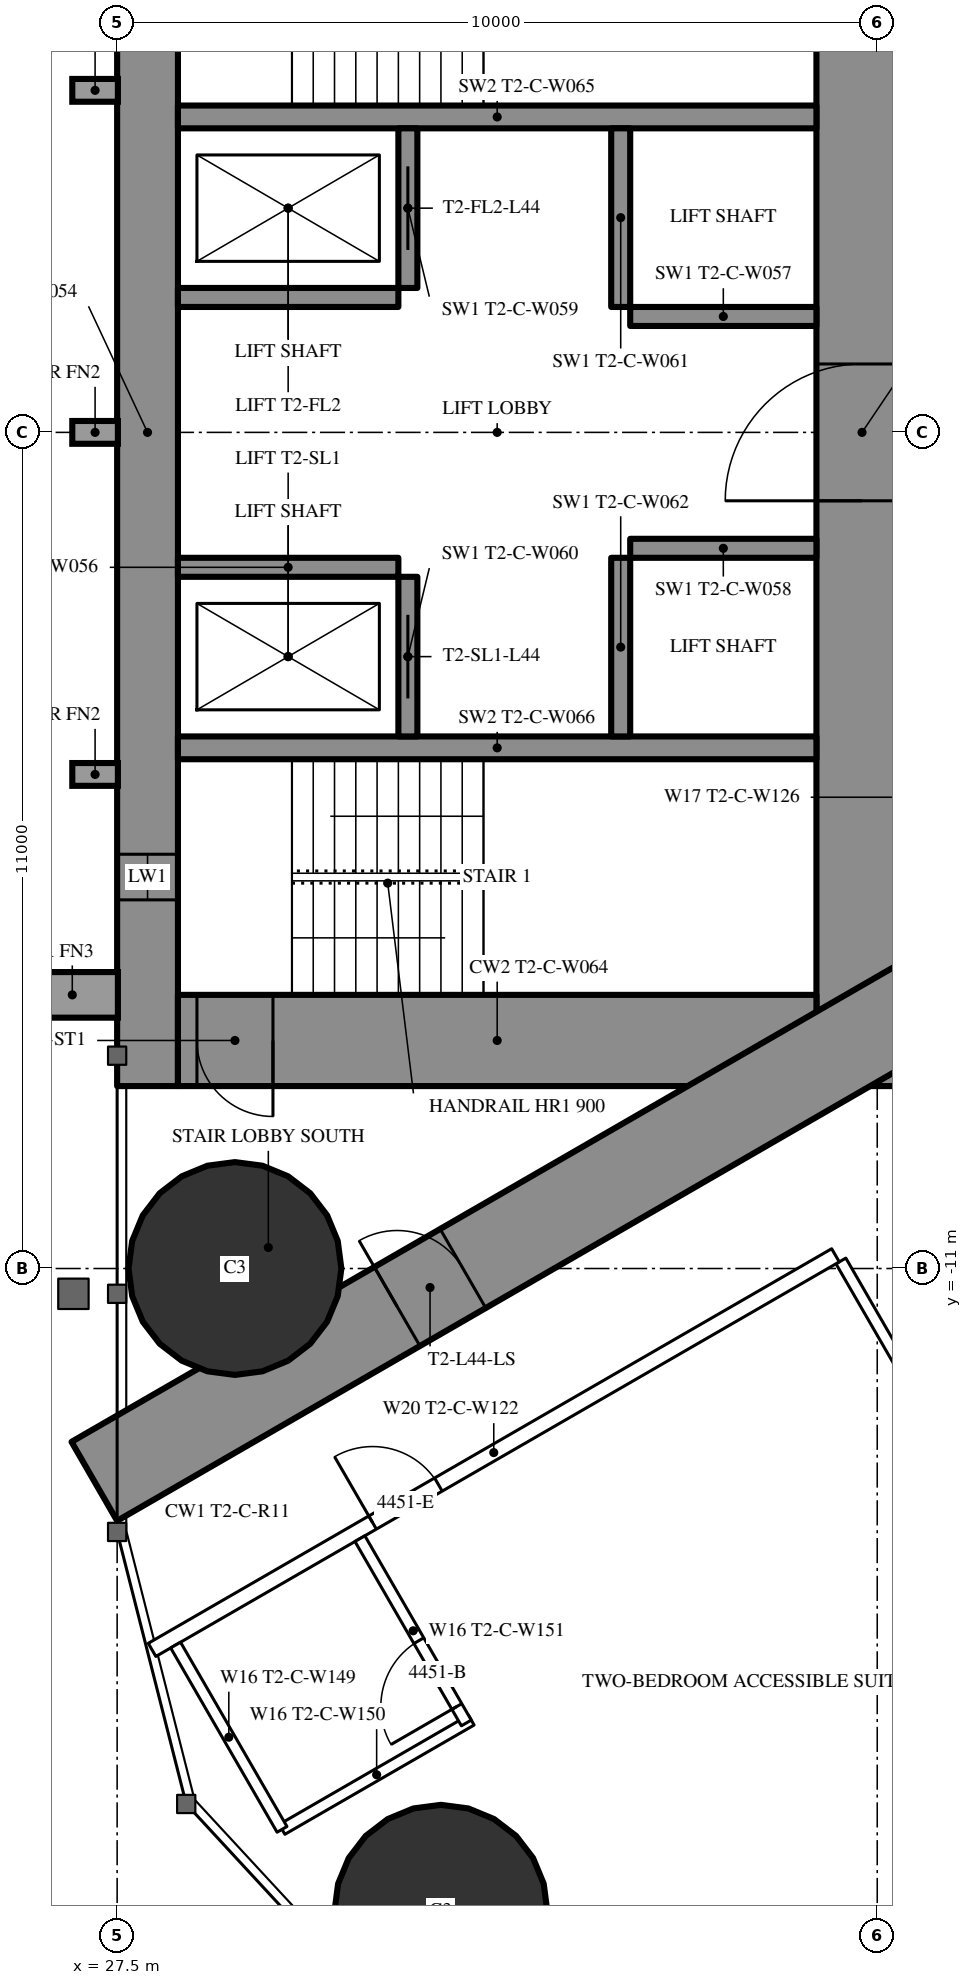
"""IFC4 building model, lengths in metres.
Left out: names, types, materials, properties, quantities, classifications, styles, units other than length and angle.
Written with IfcOpenShell. Run it as: python <this file> out.ifc"""

import sys

from ifc_helpers import new_model, si_unit, direction, frame, frame_2d, origin, origin_2d, place, context, subcontext, project, spatial, rectangle, circle, extrude, element, fill, save


model = new_model("IFC4")
c1 = context("Model", 3, precision=1e-05, world=origin(), true_north=direction((0.0, 1.0)))
c2 = subcontext(c1, "Body", "Model", "MODEL_VIEW")
j1 = project(units=[si_unit("LENGTHUNIT", "METRE"), si_unit("PLANEANGLEUNIT", "RADIAN")], contexts=[c1])
p1 = place(None, origin())
s1 = spatial("IfcSite", under=j1, at=p1, CompositionType="ELEMENT")
p2 = place(p1, origin())
s2 = spatial("IfcBuilding", under=s1, at=p2, CompositionType="ELEMENT")
p3 = place(p2, frame((0.0, 0.0, 166.8)))
s3 = spatial("IfcBuildingStorey", under=s2, at=p3, CompositionType="ELEMENT", Elevation=166.8)
for number, where, z_axis, x_axis in (
    (1, (31.76, -19.456, 0.0), (0.0, 0.0, 1.0), (1.0, 0.0, 0.0)),
    (2, (29.05, -11.0, 0.0), (0.0, 0.0, 1.0), (1.0, 0.0, 0.0)),
):
    element("IfcColumn", number, at=place(p3, frame(where, z_axis=z_axis, x_axis=x_axis)), inside=s3, PredefinedType="COLUMN", context=c2, shape_type="SweptSolid", body=[
        extrude(circle(Radius=1.4, at=origin_2d()), origin(), (0.0, 0.0, 1.0), 3.5),
    ])
p4 = place(p3, frame((27.9, -8.6, 0.0), z_axis=(0.0, 0.0, 1.0), x_axis=(0.0, 1.0, 0.0)))
e3 = element("IfcWall", 3, at=p4, inside=s3, PredefinedType="SHEAR", context=c2, shape_type="SweptSolid", body=[
    extrude(rectangle(XDim=17.2, YDim=0.8, at=frame_2d((8.6, 0.0))), origin(), (0.0, 0.0, 1.0), 3.5),
])
p5 = place(p4, frame((2.45, 0.0, 0.6)))
e4 = element("IfcOpeningElement", 4, at=p5, cuts=e3, PredefinedType="OPENING", context=c2, shape_type="SweptSolid", body=[
    extrude(rectangle(XDim=0.6, YDim=2.1, at=frame_2d((0.3, 1.05))), frame((0.0, 0.41, 0.0), z_axis=(0.0, -1.0, 0.0), x_axis=(1.0, 0.0, 0.0)), (0.0, 0.0, 1.0), 0.82),
])
p6 = place(p4, frame((14.15, 0.0, 0.6)))
e5 = element("IfcOpeningElement", 5, at=p6, cuts=e3, PredefinedType="OPENING", context=c2, shape_type="SweptSolid", body=[
    extrude(rectangle(XDim=0.6, YDim=2.1, at=frame_2d((0.3, 1.05))), frame((0.0, 0.41, 0.0), z_axis=(0.0, -1.0, 0.0), x_axis=(1.0, 0.0, 0.0)), (0.0, 0.0, 1.0), 0.82),
])
p7 = place(p3, frame((37.3, -8.6, 0.0), z_axis=(0.0, 0.0, 1.0), x_axis=(0.0, 1.0, 0.0)))
e6 = element("IfcWall", 6, at=p7, inside=s3, PredefinedType="SHEAR", context=c2, shape_type="SweptSolid", body=[
    extrude(rectangle(XDim=17.2, YDim=1.2, at=frame_2d((8.6, 0.0))), origin(), (0.0, 0.0, 1.0), 3.5),
])
p8 = place(p7, frame((7.7, 0.0, 0.0)))
e7 = element("IfcOpeningElement", 7, at=p8, cuts=e6, PredefinedType="OPENING", context=c2, shape_type="SweptSolid", body=[
    extrude(rectangle(XDim=1.8, YDim=2.2, at=frame_2d((0.9, 1.1))), frame((0.0, 0.61, 0.0), z_axis=(0.0, -1.0, 0.0), x_axis=(1.0, 0.0, 0.0)), (0.0, 0.0, 1.0), 1.22),
])
p9 = place(p3, frame((28.3, -8.0, 0.0), z_axis=(0.0, 0.0, 1.0), x_axis=(1.0, 0.0, 0.0)))
e8 = element("IfcWall", 8, at=p9, inside=s3, PredefinedType="SHEAR", context=c2, shape_type="SweptSolid", body=[
    extrude(rectangle(XDim=8.4, YDim=1.2, at=frame_2d((4.2, 0.0))), origin(), (0.0, 0.0, 1.0), 3.5),
])
p10 = place(p9, frame((0.25, 0.0, 0.0)))
e9 = element("IfcOpeningElement", 9, at=p10, cuts=e8, PredefinedType="OPENING", context=c2, shape_type="SweptSolid", body=[
    extrude(rectangle(XDim=1.0, YDim=2.2, at=frame_2d((0.5, 1.1))), frame((0.0, 0.61, 0.0), z_axis=(0.0, -1.0, 0.0), x_axis=(1.0, 0.0, 0.0)), (0.0, 0.0, 1.0), 1.22),
])
for number, where, z_axis, x_axis in (
    (10, (28.3, -4.15, 0.0), (0.0, 0.0, 1.0), (1.0, 0.0, 0.0)),
    (11, (28.3, 4.15, 0.0), (0.0, 0.0, 1.0), (1.0, 0.0, 0.0)),
):
    element("IfcWall", number, at=place(p3, frame(where, z_axis=z_axis, x_axis=x_axis)), inside=s3, PredefinedType="SHEAR", context=c2, shape_type="SweptSolid", body=[
        extrude(rectangle(XDim=8.4, YDim=0.3, at=frame_2d((4.2, 0.0))), origin(), (0.0, 0.0, 1.0), 3.5),
    ])
p11 = place(p3, frame((31.325, -4.0, 0.0), z_axis=(0.0, 0.0, 1.0), x_axis=(0.0, 1.0, 0.0)))
e12 = element("IfcWall", 12, at=p11, inside=s3, PredefinedType="SHEAR", context=c2, shape_type="SweptSolid", body=[
    extrude(rectangle(XDim=2.1, YDim=0.25, at=frame_2d((1.05, 0.0))), origin(), (0.0, 0.0, 1.0), 3.5),
])
p12 = place(p11, frame((0.5, 0.0, 0.0)))
e13 = element("IfcOpeningElement", 13, at=p12, cuts=e12, PredefinedType="OPENING", context=c2, shape_type="SweptSolid", body=[
    extrude(rectangle(XDim=1.1, YDim=2.2, at=frame_2d((0.55, 1.1))), frame((0.0, 0.135, 0.0), z_axis=(0.0, -1.0, 0.0), x_axis=(1.0, 0.0, 0.0)), (0.0, 0.0, 1.0), 0.27),
])
p13 = place(p3, frame((34.125, -4.0, 0.0), z_axis=(0.0, 0.0, 1.0), x_axis=(0.0, 1.0, 0.0)))
e14 = element("IfcWall", 14, at=p13, inside=s3, PredefinedType="SHEAR", context=c2, shape_type="SweptSolid", body=[
    extrude(rectangle(XDim=2.35, YDim=0.25, at=frame_2d((1.175, 0.0))), origin(), (0.0, 0.0, 1.0), 3.5),
])
p14 = place(p3, frame((28.3, -1.775, 0.0), z_axis=(0.0, 0.0, 1.0), x_axis=(1.0, 0.0, 0.0)))
e15 = element("IfcWall", 15, at=p14, inside=s3, PredefinedType="SHEAR", context=c2, shape_type="SweptSolid", body=[
    extrude(rectangle(XDim=2.9, YDim=0.25, at=frame_2d((1.45, 0.0))), origin(), (0.0, 0.0, 1.0), 3.5),
])
p15 = place(p3, frame((34.25, -1.525, 0.0), z_axis=(0.0, 0.0, 1.0), x_axis=(1.0, 0.0, 0.0)))
e16 = element("IfcWall", 16, at=p15, inside=s3, PredefinedType="SHEAR", context=c2, shape_type="SweptSolid", body=[
    extrude(rectangle(XDim=2.45, YDim=0.25, at=frame_2d((1.225, 0.0))), origin(), (0.0, 0.0, 1.0), 3.5),
])
p16 = place(p3, frame((31.325, 1.9, 0.0), z_axis=(0.0, 0.0, 1.0), x_axis=(0.0, 1.0, 0.0)))
e17 = element("IfcWall", 17, at=p16, inside=s3, PredefinedType="SHEAR", context=c2, shape_type="SweptSolid", body=[
    extrude(rectangle(XDim=2.1, YDim=0.25, at=frame_2d((1.05, 0.0))), origin(), (0.0, 0.0, 1.0), 3.5),
])
p17 = place(p16, frame((0.5, 0.0, 0.0)))
e18 = element("IfcOpeningElement", 18, at=p17, cuts=e17, PredefinedType="OPENING", context=c2, shape_type="SweptSolid", body=[
    extrude(rectangle(XDim=1.1, YDim=2.2, at=frame_2d((0.55, 1.1))), frame((0.0, 0.135, 0.0), z_axis=(0.0, -1.0, 0.0), x_axis=(1.0, 0.0, 0.0)), (0.0, 0.0, 1.0), 0.27),
])
p18 = place(p3, frame((34.125, 1.65, 0.0), z_axis=(0.0, 0.0, 1.0), x_axis=(0.0, 1.0, 0.0)))
e19 = element("IfcWall", 19, at=p18, inside=s3, PredefinedType="SHEAR", context=c2, shape_type="SweptSolid", body=[
    extrude(rectangle(XDim=2.35, YDim=0.25, at=frame_2d((1.175, 0.0))), origin(), (0.0, 0.0, 1.0), 3.5),
])
p19 = place(p3, frame((28.3, 1.775, 0.0), z_axis=(0.0, 0.0, 1.0), x_axis=(1.0, 0.0, 0.0)))
e20 = element("IfcWall", 20, at=p19, inside=s3, PredefinedType="SHEAR", context=c2, shape_type="SweptSolid", body=[
    extrude(rectangle(XDim=2.9, YDim=0.25, at=frame_2d((1.45, 0.0))), origin(), (0.0, 0.0, 1.0), 3.5),
])
p20 = place(p3, frame((34.25, 1.525, 0.0), z_axis=(0.0, 0.0, 1.0), x_axis=(1.0, 0.0, 0.0)))
e21 = element("IfcWall", 21, at=p20, inside=s3, PredefinedType="SHEAR", context=c2, shape_type="SweptSolid", body=[
    extrude(rectangle(XDim=2.45, YDim=0.25, at=frame_2d((1.225, 0.0))), origin(), (0.0, 0.0, 1.0), 3.5),
])
p21 = place(p3, frame((27.2, -13.8, 0.0), z_axis=(0.0, 0.0, 1.0), x_axis=(0.866027159892, 0.499996958321, 0.0)))
e22 = element("IfcWall", 22, at=p21, inside=s3, PredefinedType="SHEAR", context=c2, shape_type="SweptSolid", body=[
    extrude(rectangle(XDim=27.947, YDim=1.2, at=frame_2d((13.973, 0.0))), origin(), (0.0, 0.0, 1.0), 3.5),
])
p22 = place(p21, frame((4.6, 0.0, 0.0)))
e23 = element("IfcOpeningElement", 23, at=p22, cuts=e22, PredefinedType="OPENING", context=c2, shape_type="SweptSolid", body=[
    extrude(rectangle(XDim=1.0, YDim=2.2, at=frame_2d((0.5, 1.1))), frame((0.0, 0.61, 0.0), z_axis=(0.0, -1.0, 0.0), x_axis=(1.0, 0.0, 0.0)), (0.0, 0.0, 1.0), 1.22),
])
p23 = place(p21, frame((13.395, 0.0, 0.0)))
e24 = element("IfcOpeningElement", 24, at=p23, cuts=e22, PredefinedType="OPENING", context=c2, shape_type="SweptSolid", body=[
    extrude(rectangle(XDim=1.8, YDim=2.2, at=frame_2d((0.9, 1.1))), frame((0.0, 0.61, 0.0), z_axis=(0.0, -1.0, 0.0), x_axis=(1.0, 0.0, 0.0)), (0.0, 0.0, 1.0), 1.22),
])
p24 = place(p3, frame((27.2, 13.8, 0.0), z_axis=(0.0, 0.0, 1.0), x_axis=(0.866024515034, -0.500001539357, 0.0)))
e25 = element("IfcWall", 25, at=p24, inside=s3, PredefinedType="SHEAR", context=c2, shape_type="SweptSolid", body=[
    extrude(rectangle(XDim=26.907, YDim=1.2, at=frame_2d((13.454, 0.0))), origin(), (0.0, 0.0, 1.0), 3.5),
])
p25 = place(p24, frame((4.6, 0.0, 0.0)))
e26 = element("IfcOpeningElement", 26, at=p25, cuts=e25, PredefinedType="OPENING", context=c2, shape_type="SweptSolid", body=[
    extrude(rectangle(XDim=1.0, YDim=2.2, at=frame_2d((0.5, 1.1))), frame((0.0, 0.61, 0.0), z_axis=(0.0, -1.0, 0.0), x_axis=(1.0, 0.0, 0.0)), (0.0, 0.0, 1.0), 1.22),
])
p26 = place(p24, frame((13.395, 0.0, 0.0)))
e27 = element("IfcOpeningElement", 27, at=p26, cuts=e25, PredefinedType="OPENING", context=c2, shape_type="SweptSolid", body=[
    extrude(rectangle(XDim=1.8, YDim=2.2, at=frame_2d((0.9, 1.1))), frame((0.0, 0.61, 0.0), z_axis=(0.0, -1.0, 0.0), x_axis=(1.0, 0.0, 0.0)), (0.0, 0.0, 1.0), 1.22),
])
p27 = place(p3, frame((37.022, -10.9, 0.0), z_axis=(0.0, 0.0, 1.0), x_axis=(0.499998620953, -0.866026199976, 0.0)))
e28 = element("IfcWall", 28, at=p27, inside=s3, PredefinedType="PARTITIONING", context=c2, shape_type="SweptSolid", body=[
    extrude(rectangle(XDim=9.77, YDim=0.15, at=frame_2d((4.885, 0.0))), origin(), (0.0, 0.0, 1.0), 3.25),
])
p28 = place(p3, frame((27.959, -16.017, 0.0), z_axis=(0.0, 0.0, 1.0), x_axis=(0.866026201739, 0.499998617899, 0.0)))
e29 = element("IfcWall", 29, at=p28, inside=s3, PredefinedType="PARTITIONING", context=c2, shape_type="SweptSolid", body=[
    extrude(rectangle(XDim=10.382, YDim=0.2, at=frame_2d((5.191, 0.0))), origin(), (0.0, 0.0, 1.0), 3.25),
])
p29 = place(p28, frame((3.35, 0.0, 0.0)))
e30 = element("IfcOpeningElement", 30, at=p29, cuts=e29, PredefinedType="OPENING", context=c2, shape_type="SweptSolid", body=[
    extrude(rectangle(XDim=1.0, YDim=2.2, at=frame_2d((0.5, 1.1))), frame((0.0, 0.11, 0.0), z_axis=(0.0, -1.0, 0.0), x_axis=(1.0, 0.0, 0.0)), (0.0, 0.0, 1.0), 0.22),
])
p30 = place(p3, frame((29.669, -18.379, 0.0), z_axis=(0.0, 0.0, 1.0), x_axis=(0.866039941686, 0.499974818771, 0.0)))
e31 = element("IfcWall", 31, at=p30, inside=s3, PredefinedType="PARTITIONING", context=c2, shape_type="SweptSolid", body=[
    extrude(rectangle(XDim=2.875, YDim=0.15, at=frame_2d((1.438, 0.0))), origin(), (0.0, 0.0, 1.0), 3.25),
])
p31 = place(p3, frame((30.694, -14.554, 0.0), z_axis=(0.0, 0.0, 1.0), x_axis=(0.500049511043, -0.865996816683, 0.0)))
e32 = element("IfcWall", 32, at=p31, inside=s3, PredefinedType="PARTITIONING", context=c2, shape_type="SweptSolid", body=[
    extrude(rectangle(XDim=2.8, YDim=0.15, at=frame_2d((1.4, 0.0))), origin(), (0.0, 0.0, 1.0), 2.3),
])
p32 = place(p31, frame((1.55, 0.0, 0.0)))
e33 = element("IfcOpeningElement", 33, at=p32, cuts=e32, PredefinedType="OPENING", context=c2, shape_type="SweptSolid", body=[
    extrude(rectangle(XDim=1.0, YDim=2.2, at=frame_2d((0.5, 1.1))), frame((0.0, 0.085, 0.0), z_axis=(0.0, -1.0, 0.0), x_axis=(1.0, 0.0, 0.0)), (0.0, 0.0, 1.0), 0.17),
])
p33 = place(p3, frame((28.269, -15.954, 0.0), z_axis=(0.0, 0.0, 1.0), x_axis=(0.49998411664, -0.866034573852, 0.0)))
e34 = element("IfcWall", 34, at=p33, inside=s3, PredefinedType="PARTITIONING", context=c2, shape_type="SweptSolid", body=[
    extrude(rectangle(XDim=2.8, YDim=0.15, at=frame_2d((1.4, 0.0))), origin(), (0.0, 0.0, 1.0), 3.25),
])
p34 = place(p32, origin())
e35 = element("IfcDoor", 35, at=p34, inside=s3, OperationType="SINGLE_SWING_RIGHT", PredefinedType="DOOR", context=c2, shape_type="SweptSolid", body=[
    extrude(rectangle(XDim=1.0, YDim=2.2, at=frame_2d((0.5, 1.1))), frame((0.0, 0.025, 0.0), z_axis=(0.0, -1.0, 0.0), x_axis=(1.0, 0.0, 0.0)), (0.0, 0.0, 1.0), 0.05),
])
fill(e33, e35)
p35 = place(p29, origin())
e36 = element("IfcDoor", 36, at=p35, inside=s3, OperationType="SINGLE_SWING_LEFT", PredefinedType="DOOR", context=c2, shape_type="SweptSolid", body=[
    extrude(rectangle(XDim=1.0, YDim=2.2, at=frame_2d((0.5, 1.1))), frame((0.0, 0.025, 0.0), z_axis=(0.0, -1.0, 0.0), x_axis=(1.0, 0.0, 0.0)), (0.0, 0.0, 1.0), 0.05),
])
fill(e30, e36)
p36 = place(p22, origin())
e37 = element("IfcDoor", 37, at=p36, inside=s3, OperationType="SINGLE_SWING_LEFT", PredefinedType="DOOR", context=c2, shape_type="SweptSolid", body=[
    extrude(rectangle(XDim=1.0, YDim=2.2, at=frame_2d((0.5, 1.1))), frame((0.0, 0.025, 0.0), z_axis=(0.0, -1.0, 0.0), x_axis=(1.0, 0.0, 0.0)), (0.0, 0.0, 1.0), 0.05),
])
fill(e23, e37)
p37 = place(p8, origin())
e38 = element("IfcDoor", 38, at=p37, inside=s3, OperationType="DOUBLE_DOOR_SINGLE_SWING", PredefinedType="DOOR", context=c2, shape_type="SweptSolid", body=[
    extrude(rectangle(XDim=1.8, YDim=2.2, at=frame_2d((0.9, 1.1))), frame((0.0, 0.025, 0.0), z_axis=(0.0, -1.0, 0.0), x_axis=(1.0, 0.0, 0.0)), (0.0, 0.0, 1.0), 0.05),
])
fill(e7, e38)
p38 = place(p10, origin())
e39 = element("IfcDoor", 39, at=p38, inside=s3, OperationType="SINGLE_SWING_RIGHT", PredefinedType="DOOR", context=c2, shape_type="SweptSolid", body=[
    extrude(rectangle(XDim=1.0, YDim=2.2, at=frame_2d((0.5, 1.1))), frame((0.0, 0.025, 0.0), z_axis=(0.0, -1.0, 0.0), x_axis=(1.0, 0.0, 0.0)), (0.0, 0.0, 1.0), 0.05),
])
fill(e9, e39)
p39 = place(p12, origin())
e40 = element("IfcDoor", 40, at=p39, inside=s3, OperationType="SLIDING_TO_LEFT", PredefinedType="USERDEFINED", context=c2, shape_type="SweptSolid", body=[
    extrude(rectangle(XDim=1.1, YDim=2.2, at=frame_2d((0.55, 1.1))), frame((0.0, 0.025, 0.0), z_axis=(0.0, -1.0, 0.0), x_axis=(1.0, 0.0, 0.0)), (0.0, 0.0, 1.0), 0.05),
])
fill(e13, e40)
p40 = place(p17, origin())
e41 = element("IfcDoor", 41, at=p40, inside=s3, OperationType="SLIDING_TO_LEFT", PredefinedType="USERDEFINED", context=c2, shape_type="SweptSolid", body=[
    extrude(rectangle(XDim=1.1, YDim=2.2, at=frame_2d((0.55, 1.1))), frame((0.0, 0.025, 0.0), z_axis=(0.0, -1.0, 0.0), x_axis=(1.0, 0.0, 0.0)), (0.0, 0.0, 1.0), 0.05),
])
fill(e18, e41)
p41 = place(p5, origin())
e42 = element("IfcWindow", 42, at=p41, inside=s3, PartitioningType="SINGLE_PANEL", PredefinedType="WINDOW", context=c2, shape_type="SweptSolid", body=[
    extrude(rectangle(XDim=0.6, YDim=2.1, at=frame_2d((0.3, 1.05))), frame((0.0, 0.03, 0.0), z_axis=(0.0, -1.0, 0.0), x_axis=(1.0, 0.0, 0.0)), (0.0, 0.0, 1.0), 0.06),
])
fill(e4, e42)
save(model, sys.argv[1])
